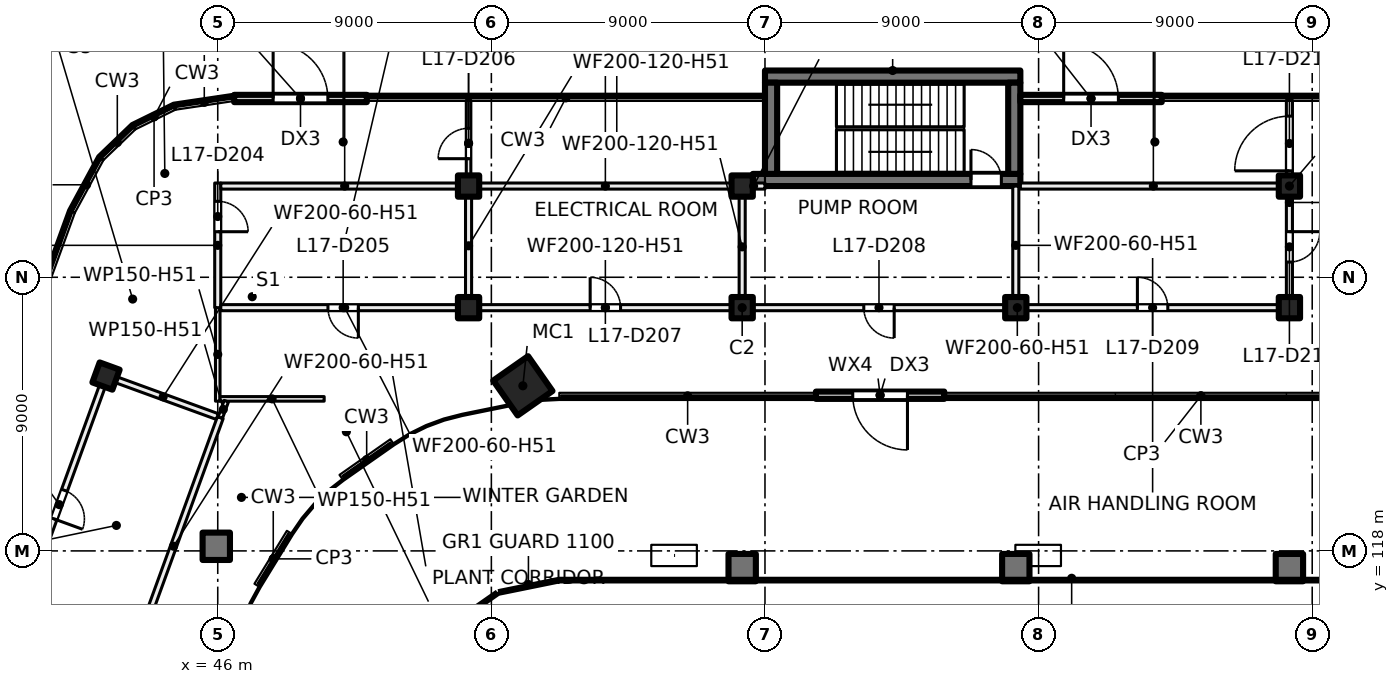
"""IFC4 building model, lengths in metres.
Left out: names, types, materials, properties, quantities, classifications, styles, units other than length and angle.
Written with IfcOpenShell. Run it as: python <this file> out.ifc"""

import sys

from ifc_helpers import new_model, si_unit, direction, frame, frame_2d, origin, origin_2d, place, context, subcontext, project, spatial, rectangle, hollow_rectangle, extrude, element, fill, save


model = new_model("IFC4")
c1 = context("Model", 3, precision=1e-05, world=origin(), true_north=direction((0.0, 1.0)))
c2 = subcontext(c1, "Body", "Model", "MODEL_VIEW")
j1 = project(units=[si_unit("LENGTHUNIT", "METRE"), si_unit("PLANEANGLEUNIT", "RADIAN")], contexts=[c1])
p1 = place(None, origin())
s1 = spatial("IfcSite", under=j1, at=p1, CompositionType="ELEMENT")
p2 = place(p1, origin())
s2 = spatial("IfcBuilding", under=s1, at=p2, CompositionType="ELEMENT")
p3 = place(p2, frame((0.0, 0.0, 75.5)))
s3 = spatial("IfcBuildingStorey", under=s2, at=p3, CompositionType="ELEMENT", Elevation=75.5)
p4 = place(p3, frame((56.036, 123.43, 0.0), z_axis=(0.0, 0.0, 1.0), x_axis=(0.573576436351, -0.819152044289, 0.0)))
e1 = element("IfcColumn", 1, at=p4, inside=s3, PredefinedType="COLUMN", context=c2, shape_type="SweptSolid", body=[
    extrude(hollow_rectangle(XDim=1.4, YDim=1.4, WallThickness=0.04, at=origin_2d()), origin(), (0.0, 0.0, 1.0), 5.5),
])
for number, where, z_axis, x_axis in (
    (2, (54.25, 130.0, 0.0), (0.0, 0.0, 1.0), (1.0, 0.0, 0.0)),
    (3, (63.25, 130.0, 0.0), (0.0, 0.0, 1.0), (1.0, 0.0, 0.0)),
    (4, (81.25, 130.0, 0.0), (0.0, 0.0, 1.0), (1.0, 0.0, 0.0)),
    (5, (54.25, 126.0, 0.0), (0.0, 0.0, 1.0), (1.0, 0.0, 0.0)),
    (6, (63.25, 126.0, 0.0), (0.0, 0.0, 1.0), (1.0, 0.0, 0.0)),
    (7, (72.25, 126.0, 0.0), (0.0, 0.0, 1.0), (1.0, 0.0, 0.0)),
    (8, (81.25, 126.0, 0.0), (0.0, 0.0, 1.0), (1.0, 0.0, 0.0)),
):
    element("IfcColumn", number, at=place(p3, frame(where, z_axis=z_axis, x_axis=x_axis)), inside=s3, PredefinedType="COLUMN", context=c2, shape_type="SweptSolid", body=[
        extrude(rectangle(XDim=0.7, YDim=0.7, at=origin_2d()), origin(), (0.0, 0.0, 1.0), 5.5),
    ])
for number, where, z_axis, x_axis in (
    (9, (45.952, 118.152, 0.0), (0.0, 0.0, 1.0), (1.0, 0.0, 0.0)),
    (10, (63.25, 117.45, 0.0), (0.0, 0.0, 1.0), (1.0, 0.0, 0.0)),
    (11, (72.25, 117.45, 0.0), (0.0, 0.0, 1.0), (1.0, 0.0, 0.0)),
    (12, (81.25, 117.45, 0.0), (0.0, 0.0, 1.0), (1.0, 0.0, 0.0)),
):
    element("IfcColumn", number, at=place(p3, frame(where, z_axis=z_axis, x_axis=x_axis)), inside=s3, PredefinedType="COLUMN", context=c2, shape_type="SweptSolid", body=[
        extrude(rectangle(XDim=0.9, YDim=0.9, at=origin_2d()), origin(), (0.0, 0.0, 1.0), 5.5),
    ])
p5 = place(p3, frame((42.325, 123.751, 0.0), z_axis=(0.0, 0.0, 1.0), x_axis=(-0.342020143326, -0.939692620786, 0.0)))
e13 = element("IfcColumn", 13, at=p5, inside=s3, PredefinedType="COLUMN", context=c2, shape_type="SweptSolid", body=[
    extrude(rectangle(XDim=0.7, YDim=0.7, at=origin_2d()), origin(), (0.0, 0.0, 1.0), 5.5),
])
p6 = place(p3, frame((63.6, 130.2, 0.0), z_axis=(0.0, 0.0, 1.0), x_axis=(1.0, 0.0, 0.0)))
e14 = element("IfcWall", 14, at=p6, inside=s3, PredefinedType="SHEAR", context=c2, shape_type="SweptSolid", body=[
    extrude(rectangle(XDim=8.8, YDim=0.4, at=frame_2d((4.4, 0.0))), origin(), (0.0, 0.0, 1.0), 5.5),
])
p7 = place(p6, frame((7.175, 0.0, 0.0)))
e15 = element("IfcOpeningElement", 15, at=p7, cuts=e14, PredefinedType="OPENING", context=c2, shape_type="SweptSolid", body=[
    extrude(rectangle(XDim=1.0, YDim=2.1, at=frame_2d((0.5, 1.05))), frame((0.0, 0.21, 0.0), z_axis=(0.0, -1.0, 0.0), x_axis=(1.0, 0.0, 0.0)), (0.0, 0.0, 1.0), 0.42),
])
p8 = place(p3, frame((64.0, 133.6, 0.0), z_axis=(0.0, 0.0, 1.0), x_axis=(1.0, 0.0, 0.0)))
e16 = element("IfcWall", 16, at=p8, inside=s3, PredefinedType="SHEAR", context=c2, shape_type="SweptSolid", body=[
    extrude(rectangle(XDim=8.4, YDim=0.4, at=frame_2d((4.2, 0.0))), origin(), (0.0, 0.0, 1.0), 5.5),
])
for number, where, z_axis, x_axis in (
    (17, (64.2, 130.4, 0.0), (0.0, 0.0, 1.0), (0.0, 1.0, 0.0)),
    (18, (72.2, 130.4, 0.0), (0.0, 0.0, 1.0), (0.0, 1.0, 0.0)),
):
    element("IfcWall", number, at=place(p3, frame(where, z_axis=z_axis, x_axis=x_axis)), inside=s3, PredefinedType="SHEAR", context=c2, shape_type="SweptSolid", body=[
        extrude(rectangle(XDim=3.0, YDim=0.4, at=frame_2d((1.5, 0.0))), origin(), (0.0, 0.0, 1.0), 5.5),
    ])
p9 = place(p3, frame((69.897, 123.12, 0.0), z_axis=(0.0, 0.0, 1.0), x_axis=(-1.0, 0.0, 0.0)))
e19 = element("IfcWall", 19, at=p9, inside=s3, PredefinedType="SOLIDWALL", context=c2, shape_type="SweptSolid", body=[
    extrude(rectangle(XDim=4.221, YDim=0.24, at=frame_2d((2.11, 0.0))), origin(), (0.0, 0.0, 1.0), 5.125),
])
p10 = place(p9, frame((1.21, 0.0, 0.0)))
e20 = element("IfcOpeningElement", 20, at=p10, cuts=e19, PredefinedType="OPENING", context=c2, shape_type="SweptSolid", body=[
    extrude(rectangle(XDim=1.8, YDim=2.4, at=frame_2d((0.9, 1.2))), frame((0.0, 0.13, 0.0), z_axis=(0.0, -1.0, 0.0), x_axis=(1.0, 0.0, 0.0)), (0.0, 0.0, 1.0), 0.26),
])
p11 = place(p3, frame((72.4, 132.88, 0.0), z_axis=(0.0, 0.0, 1.0), x_axis=(1.0, 0.0, 0.0)))
e21 = element("IfcWall", 21, at=p11, inside=s3, PredefinedType="SOLIDWALL", context=c2, shape_type="SweptSolid", body=[
    extrude(rectangle(XDim=4.65, YDim=0.24, at=frame_2d((2.325, 0.0))), origin(), (0.0, 0.0, 1.0), 5.125),
])
p12 = place(p11, frame((1.425, 0.0, 0.0)))
e22 = element("IfcOpeningElement", 22, at=p12, cuts=e21, PredefinedType="OPENING", context=c2, shape_type="SweptSolid", body=[
    extrude(rectangle(XDim=1.8, YDim=2.4, at=frame_2d((0.9, 1.2))), frame((0.0, 0.13, 0.0), z_axis=(0.0, -1.0, 0.0), x_axis=(1.0, 0.0, 0.0)), (0.0, 0.0, 1.0), 0.26),
])
p13 = place(p3, frame((46.539, 132.88, 0.0), z_axis=(0.0, 0.0, 1.0), x_axis=(1.0, 0.0, 0.0)))
e23 = element("IfcWall", 23, at=p13, inside=s3, PredefinedType="SOLIDWALL", context=c2, shape_type="SweptSolid", body=[
    extrude(rectangle(XDim=4.365, YDim=0.24, at=frame_2d((2.183, 0.0))), origin(), (0.0, 0.0, 1.0), 5.125),
])
p14 = place(p13, frame((1.283, 0.0, 0.0)))
e24 = element("IfcOpeningElement", 24, at=p14, cuts=e23, PredefinedType="OPENING", context=c2, shape_type="SweptSolid", body=[
    extrude(rectangle(XDim=1.8, YDim=2.4, at=frame_2d((0.9, 1.2))), frame((0.0, 0.13, 0.0), z_axis=(0.0, -1.0, 0.0), x_axis=(1.0, 0.0, 0.0)), (0.0, 0.0, 1.0), 0.26),
])
p15 = place(p3, frame((42.359, 123.845, 0.0), z_axis=(0.0, 0.0, 1.0), x_axis=(-0.341966001916, -0.939712324881, 0.0)))
e25 = element("IfcWall", 25, at=p15, inside=s3, PredefinedType="PARTITIONING", context=c2, shape_type="SweptSolid", body=[
    extrude(rectangle(XDim=18.2, YDim=0.2, at=frame_2d((9.1, 0.0))), origin(), (0.0, 0.0, 1.0), 5.125),
])
p16 = place(p15, frame((13.101, 0.0, 0.0)))
e26 = element("IfcOpeningElement", 26, at=p16, cuts=e25, PredefinedType="OPENING", context=c2, shape_type="SweptSolid", body=[
    extrude(rectangle(XDim=1.0, YDim=2.1, at=frame_2d((0.5, 1.05))), frame((0.0, 0.11, 0.0), z_axis=(0.0, -1.0, 0.0), x_axis=(1.0, 0.0, 0.0)), (0.0, 0.0, 1.0), 0.22),
])
p17 = place(p15, frame((4.1, 0.0, 0.0)))
e27 = element("IfcOpeningElement", 27, at=p17, cuts=e25, PredefinedType="OPENING", context=c2, shape_type="SweptSolid", body=[
    extrude(rectangle(XDim=1.0, YDim=2.1, at=frame_2d((0.5, 1.05))), frame((0.0, 0.11, 0.0), z_axis=(0.0, -1.0, 0.0), x_axis=(1.0, 0.0, 0.0)), (0.0, 0.0, 1.0), 0.22),
])
p18 = place(p3, frame((42.419, 123.717, 0.0), z_axis=(0.0, 0.0, 1.0), x_axis=(0.939667689469, -0.342088633789, 0.0)))
e28 = element("IfcWall", 28, at=p18, inside=s3, PredefinedType="PARTITIONING", context=c2, shape_type="SweptSolid", body=[
    extrude(rectangle(XDim=3.8, YDim=0.2, at=frame_2d((1.9, 0.0))), origin(), (0.0, 0.0, 1.0), 5.125),
])
p19 = place(p3, frame((43.006, 113.925, 0.0), z_axis=(0.0, 0.0, 1.0), x_axis=(0.341963022424, 0.939713409128, 0.0)))
e29 = element("IfcWall", 29, at=p19, inside=s3, PredefinedType="PARTITIONING", context=c2, shape_type="SweptSolid", body=[
    extrude(rectangle(XDim=9.001, YDim=0.2, at=frame_2d((4.5, 0.0))), origin(), (0.0, 0.0, 1.0), 5.125),
])
p20 = place(p3, frame((46.0, 122.925, 0.0), z_axis=(0.0, 0.0, 1.0), x_axis=(0.0, 1.0, 0.0)))
e30 = element("IfcWall", 30, at=p20, inside=s3, PredefinedType="PARTITIONING", context=c2, shape_type="SweptSolid", body=[
    extrude(rectangle(XDim=3.075, YDim=0.15, at=frame_2d((1.538, 0.0))), origin(), (0.0, 0.0, 1.0), 5.125),
])
p21 = place(p3, frame((46.075, 123.0, 0.0), z_axis=(0.0, 0.0, 1.0), x_axis=(1.0, 0.0, 0.0)))
e31 = element("IfcWall", 31, at=p21, inside=s3, PredefinedType="PARTITIONING", context=c2, shape_type="SweptSolid", body=[
    extrude(rectangle(XDim=3.426, YDim=0.15, at=frame_2d((1.713, 0.0))), origin(), (0.0, 0.0, 1.0), 5.125),
])
p22 = place(p3, frame((46.0, 130.1, 0.0), z_axis=(0.0, 0.0, 1.0), x_axis=(0.0, -1.0, 0.0)))
e32 = element("IfcWall", 32, at=p22, inside=s3, PredefinedType="PARTITIONING", context=c2, shape_type="SweptSolid", body=[
    extrude(rectangle(XDim=4.1, YDim=0.2, at=frame_2d((2.05, 0.0))), origin(), (0.0, 0.0, 1.0), 5.125),
])
p23 = place(p22, frame((0.602, 0.0, 0.0)))
e33 = element("IfcOpeningElement", 33, at=p23, cuts=e32, PredefinedType="OPENING", context=c2, shape_type="SweptSolid", body=[
    extrude(rectangle(XDim=1.0, YDim=2.1, at=frame_2d((0.5, 1.05))), frame((0.0, 0.11, 0.0), z_axis=(0.0, -1.0, 0.0), x_axis=(1.0, 0.0, 0.0)), (0.0, 0.0, 1.0), 0.22),
])
p24 = place(p3, frame((46.1, 126.0, 0.0), z_axis=(0.0, 0.0, 1.0), x_axis=(1.0, 0.0, 0.0)))
e34 = element("IfcWall", 34, at=p24, inside=s3, PredefinedType="PARTITIONING", context=c2, shape_type="SweptSolid", body=[
    extrude(rectangle(XDim=8.15, YDim=0.2, at=frame_2d((4.075, 0.0))), origin(), (0.0, 0.0, 1.0), 5.125),
])
p25 = place(p24, frame((3.525, 0.0, 0.0)))
e35 = element("IfcOpeningElement", 35, at=p25, cuts=e34, PredefinedType="OPENING", context=c2, shape_type="SweptSolid", body=[
    extrude(rectangle(XDim=1.0, YDim=2.1, at=frame_2d((0.5, 1.05))), frame((0.0, 0.11, 0.0), z_axis=(0.0, -1.0, 0.0), x_axis=(1.0, 0.0, 0.0)), (0.0, 0.0, 1.0), 0.22),
])
p26 = place(p3, frame((46.1, 130.0, 0.0), z_axis=(0.0, 0.0, 1.0), x_axis=(1.0, 0.0, 0.0)))
e36 = element("IfcWall", 36, at=p26, inside=s3, PredefinedType="PARTITIONING", context=c2, shape_type="SweptSolid", body=[
    extrude(rectangle(XDim=8.15, YDim=0.2, at=frame_2d((4.075, 0.0))), origin(), (0.0, 0.0, 1.0), 5.125),
])
p27 = place(p3, frame((46.084, 122.383, 0.0), z_axis=(0.0, 0.0, 1.0), x_axis=(0.343135526399, 0.939285904569, 0.0)))
e37 = element("IfcWall", 37, at=p27, inside=s3, PredefinedType="PARTITIONING", context=c2, shape_type="SweptSolid", body=[
    extrude(rectangle(XDim=0.577, YDim=0.15, at=frame_2d((0.289, 0.0))), origin(), (0.0, 0.0, 1.0), 5.125),
])
p28 = place(p3, frame((54.25, 126.1, 0.0), z_axis=(0.0, 0.0, 1.0), x_axis=(0.0, 1.0, 0.0)))
e38 = element("IfcWall", 38, at=p28, inside=s3, PredefinedType="PARTITIONING", context=c2, shape_type="SweptSolid", body=[
    extrude(rectangle(XDim=3.87, YDim=0.2, at=frame_2d((1.935, 0.0))), origin(), (0.0, 0.0, 1.0), 5.125),
])
p29 = place(p3, frame((54.25, 126.0, 0.0), z_axis=(0.0, 0.0, 1.0), x_axis=(1.0, 0.0, 0.0)))
e39 = element("IfcWall", 39, at=p29, inside=s3, PredefinedType="PARTITIONING", context=c2, shape_type="SweptSolid", body=[
    extrude(rectangle(XDim=9.0, YDim=0.2, at=frame_2d((4.5, 0.0))), origin(), (0.0, 0.0, 1.0), 5.125),
])
p30 = place(p29, frame((4.0, 0.0, 0.0)))
e40 = element("IfcOpeningElement", 40, at=p30, cuts=e39, PredefinedType="OPENING", context=c2, shape_type="SweptSolid", body=[
    extrude(rectangle(XDim=1.0, YDim=2.1, at=frame_2d((0.5, 1.05))), frame((0.0, 0.11, 0.0), z_axis=(0.0, -1.0, 0.0), x_axis=(1.0, 0.0, 0.0)), (0.0, 0.0, 1.0), 0.22),
])
p31 = place(p3, frame((54.25, 130.0, 0.0), z_axis=(0.0, 0.0, 1.0), x_axis=(0.0, 1.0, 0.0)))
e41 = element("IfcWall", 41, at=p31, inside=s3, PredefinedType="PARTITIONING", context=c2, shape_type="SweptSolid", body=[
    extrude(rectangle(XDim=2.82, YDim=0.15, at=frame_2d((1.41, 0.0))), origin(), (0.0, 0.0, 1.0), 5.125),
])
p32 = place(p31, frame((0.9, 0.0, 0.0)))
e42 = element("IfcOpeningElement", 42, at=p32, cuts=e41, PredefinedType="OPENING", context=c2, shape_type="SweptSolid", body=[
    extrude(rectangle(XDim=1.0, YDim=2.1, at=frame_2d((0.5, 1.05))), frame((0.0, 0.085, 0.0), z_axis=(0.0, -1.0, 0.0), x_axis=(1.0, 0.0, 0.0)), (0.0, 0.0, 1.0), 0.17),
])
p33 = place(p3, frame((54.25, 130.0, 0.0), z_axis=(0.0, 0.0, 1.0), x_axis=(1.0, 0.0, 0.0)))
e43 = element("IfcWall", 43, at=p33, inside=s3, PredefinedType="PARTITIONING", context=c2, shape_type="SweptSolid", body=[
    extrude(rectangle(XDim=9.0, YDim=0.2, at=frame_2d((4.5, 0.0))), origin(), (0.0, 0.0, 1.0), 5.125),
])
p34 = place(p3, frame((63.25, 126.1, 0.0), z_axis=(0.0, 0.0, 1.0), x_axis=(0.0, 1.0, 0.0)))
e44 = element("IfcWall", 44, at=p34, inside=s3, PredefinedType="PARTITIONING", context=c2, shape_type="SweptSolid", body=[
    extrude(rectangle(XDim=3.8, YDim=0.2, at=frame_2d((1.9, 0.0))), origin(), (0.0, 0.0, 1.0), 5.125),
])
p35 = place(p3, frame((63.25, 126.0, 0.0), z_axis=(0.0, 0.0, 1.0), x_axis=(1.0, 0.0, 0.0)))
e45 = element("IfcWall", 45, at=p35, inside=s3, PredefinedType="PARTITIONING", context=c2, shape_type="SweptSolid", body=[
    extrude(rectangle(XDim=18.1, YDim=0.2, at=frame_2d((9.05, 0.0))), origin(), (0.0, 0.0, 1.0), 5.125),
])
p36 = place(p35, frame((4.0, 0.0, 0.0)))
e46 = element("IfcOpeningElement", 46, at=p36, cuts=e45, PredefinedType="OPENING", context=c2, shape_type="SweptSolid", body=[
    extrude(rectangle(XDim=1.0, YDim=2.1, at=frame_2d((0.5, 1.05))), frame((0.0, 0.11, 0.0), z_axis=(0.0, -1.0, 0.0), x_axis=(1.0, 0.0, 0.0)), (0.0, 0.0, 1.0), 0.22),
])
p37 = place(p35, frame((13.0, 0.0, 0.0)))
e47 = element("IfcOpeningElement", 47, at=p37, cuts=e45, PredefinedType="OPENING", context=c2, shape_type="SweptSolid", body=[
    extrude(rectangle(XDim=1.0, YDim=2.1, at=frame_2d((0.5, 1.05))), frame((0.0, 0.11, 0.0), z_axis=(0.0, -1.0, 0.0), x_axis=(1.0, 0.0, 0.0)), (0.0, 0.0, 1.0), 0.22),
])
p38 = place(p3, frame((63.25, 130.0, 0.0), z_axis=(0.0, 0.0, 1.0), x_axis=(1.0, 0.0, 0.0)))
e48 = element("IfcWall", 48, at=p38, inside=s3, PredefinedType="PARTITIONING", context=c2, shape_type="SweptSolid", body=[
    extrude(rectangle(XDim=0.75, YDim=0.2, at=frame_2d((0.375, 0.0))), origin(), (0.0, 0.0, 1.0), 5.125),
])
p39 = place(p3, frame((72.25, 126.1, 0.0), z_axis=(0.0, 0.0, 1.0), x_axis=(0.0, 1.0, 0.0)))
e49 = element("IfcWall", 49, at=p39, inside=s3, PredefinedType="PARTITIONING", context=c2, shape_type="SweptSolid", body=[
    extrude(rectangle(XDim=3.9, YDim=0.2, at=frame_2d((1.95, 0.0))), origin(), (0.0, 0.0, 1.0), 5.125),
])
p40 = place(p3, frame((72.4, 130.0, 0.0), z_axis=(0.0, 0.0, 1.0), x_axis=(1.0, 0.0, 0.0)))
e50 = element("IfcWall", 50, at=p40, inside=s3, PredefinedType="PARTITIONING", context=c2, shape_type="SweptSolid", body=[
    extrude(rectangle(XDim=8.75, YDim=0.2, at=frame_2d((4.375, 0.0))), origin(), (0.0, 0.0, 1.0), 5.125),
])
p41 = place(p3, frame((81.25, 126.1, 0.0), z_axis=(0.0, 0.0, 1.0), x_axis=(0.0, 1.0, 0.0)))
e51 = element("IfcWall", 51, at=p41, inside=s3, PredefinedType="PARTITIONING", context=c2, shape_type="SweptSolid", body=[
    extrude(rectangle(XDim=6.72, YDim=0.2, at=frame_2d((3.36, 0.0))), origin(), (0.0, 0.0, 1.0), 5.125),
])
p42 = place(p41, frame((1.4, 0.0, 0.0)))
e52 = element("IfcOpeningElement", 52, at=p42, cuts=e51, PredefinedType="OPENING", context=c2, shape_type="SweptSolid", body=[
    extrude(rectangle(XDim=1.0, YDim=2.1, at=frame_2d((0.5, 1.05))), frame((0.0, 0.11, 0.0), z_axis=(0.0, -1.0, 0.0), x_axis=(1.0, 0.0, 0.0)), (0.0, 0.0, 1.0), 0.22),
])
p43 = place(p41, frame((4.4, 0.0, 0.0)))
e53 = element("IfcOpeningElement", 53, at=p43, cuts=e51, PredefinedType="OPENING", context=c2, shape_type="SweptSolid", body=[
    extrude(rectangle(XDim=1.8, YDim=2.1, at=frame_2d((0.9, 1.05))), frame((0.0, 0.11, 0.0), z_axis=(0.0, -1.0, 0.0), x_axis=(1.0, 0.0, 0.0)), (0.0, 0.0, 1.0), 0.22),
])
p44 = place(p10, origin())
e54 = element("IfcDoor", 54, at=p44, inside=s3, OperationType="DOUBLE_DOOR_SINGLE_SWING", PredefinedType="DOOR", context=c2, shape_type="SweptSolid", body=[
    extrude(rectangle(XDim=1.8, YDim=2.4, at=frame_2d((0.9, 1.2))), frame((0.0, 0.025, 0.0), z_axis=(0.0, -1.0, 0.0), x_axis=(1.0, 0.0, 0.0)), (0.0, 0.0, 1.0), 0.05),
])
fill(e20, e54)
p45 = place(p12, origin())
e55 = element("IfcDoor", 55, at=p45, inside=s3, OperationType="DOUBLE_DOOR_SINGLE_SWING", PredefinedType="DOOR", context=c2, shape_type="SweptSolid", body=[
    extrude(rectangle(XDim=1.8, YDim=2.4, at=frame_2d((0.9, 1.2))), frame((0.0, 0.025, 0.0), z_axis=(0.0, -1.0, 0.0), x_axis=(1.0, 0.0, 0.0)), (0.0, 0.0, 1.0), 0.05),
])
fill(e22, e55)
p46 = place(p14, origin())
e56 = element("IfcDoor", 56, at=p46, inside=s3, OperationType="DOUBLE_DOOR_SINGLE_SWING", PredefinedType="DOOR", context=c2, shape_type="SweptSolid", body=[
    extrude(rectangle(XDim=1.8, YDim=2.4, at=frame_2d((0.9, 1.2))), frame((0.0, 0.025, 0.0), z_axis=(0.0, -1.0, 0.0), x_axis=(1.0, 0.0, 0.0)), (0.0, 0.0, 1.0), 0.05),
])
fill(e24, e56)
p47 = place(p7, origin())
e57 = element("IfcDoor", 57, at=p47, inside=s3, OperationType="SINGLE_SWING_LEFT", PredefinedType="DOOR", context=c2, shape_type="SweptSolid", body=[
    extrude(rectangle(XDim=1.0, YDim=2.1, at=frame_2d((0.5, 1.05))), frame((0.0, 0.025, 0.0), z_axis=(0.0, -1.0, 0.0), x_axis=(1.0, 0.0, 0.0)), (0.0, 0.0, 1.0), 0.05),
])
fill(e15, e57)
p48 = place(p17, origin())
e58 = element("IfcDoor", 58, at=p48, inside=s3, OperationType="SINGLE_SWING_RIGHT", PredefinedType="DOOR", context=c2, shape_type="SweptSolid", body=[
    extrude(rectangle(XDim=1.0, YDim=2.1, at=frame_2d((0.5, 1.05))), frame((0.0, 0.025, 0.0), z_axis=(0.0, -1.0, 0.0), x_axis=(1.0, 0.0, 0.0)), (0.0, 0.0, 1.0), 0.05),
])
fill(e27, e58)
p49 = place(p23, origin())
e59 = element("IfcDoor", 59, at=p49, inside=s3, OperationType="SINGLE_SWING_RIGHT", PredefinedType="DOOR", context=c2, shape_type="SweptSolid", body=[
    extrude(rectangle(XDim=1.0, YDim=2.1, at=frame_2d((0.5, 1.05))), frame((0.0, 0.025, 0.0), z_axis=(0.0, -1.0, 0.0), x_axis=(1.0, 0.0, 0.0)), (0.0, 0.0, 1.0), 0.05),
])
fill(e33, e59)
p50 = place(p25, origin())
e60 = element("IfcDoor", 60, at=p50, inside=s3, OperationType="SINGLE_SWING_RIGHT", PredefinedType="DOOR", context=c2, shape_type="SweptSolid", body=[
    extrude(rectangle(XDim=1.0, YDim=2.1, at=frame_2d((0.5, 1.05))), frame((0.0, 0.025, 0.0), z_axis=(0.0, -1.0, 0.0), x_axis=(1.0, 0.0, 0.0)), (0.0, 0.0, 1.0), 0.05),
])
fill(e35, e60)
p51 = place(p32, origin())
e61 = element("IfcDoor", 61, at=p51, inside=s3, OperationType="SINGLE_SWING_LEFT", PredefinedType="DOOR", context=c2, shape_type="SweptSolid", body=[
    extrude(rectangle(XDim=1.0, YDim=2.1, at=frame_2d((0.5, 1.05))), frame((0.0, 0.025, 0.0), z_axis=(0.0, -1.0, 0.0), x_axis=(1.0, 0.0, 0.0)), (0.0, 0.0, 1.0), 0.05),
])
fill(e42, e61)
p52 = place(p30, origin())
e62 = element("IfcDoor", 62, at=p52, inside=s3, OperationType="SINGLE_SWING_LEFT", PredefinedType="DOOR", context=c2, shape_type="SweptSolid", body=[
    extrude(rectangle(XDim=1.0, YDim=2.1, at=frame_2d((0.5, 1.05))), frame((0.0, 0.025, 0.0), z_axis=(0.0, -1.0, 0.0), x_axis=(1.0, 0.0, 0.0)), (0.0, 0.0, 1.0), 0.05),
])
fill(e40, e62)
p53 = place(p36, origin())
e63 = element("IfcDoor", 63, at=p53, inside=s3, OperationType="SINGLE_SWING_RIGHT", PredefinedType="DOOR", context=c2, shape_type="SweptSolid", body=[
    extrude(rectangle(XDim=1.0, YDim=2.1, at=frame_2d((0.5, 1.05))), frame((0.0, 0.025, 0.0), z_axis=(0.0, -1.0, 0.0), x_axis=(1.0, 0.0, 0.0)), (0.0, 0.0, 1.0), 0.05),
])
fill(e46, e63)
p54 = place(p37, origin())
e64 = element("IfcDoor", 64, at=p54, inside=s3, OperationType="SINGLE_SWING_LEFT", PredefinedType="DOOR", context=c2, shape_type="SweptSolid", body=[
    extrude(rectangle(XDim=1.0, YDim=2.1, at=frame_2d((0.5, 1.05))), frame((0.0, 0.025, 0.0), z_axis=(0.0, -1.0, 0.0), x_axis=(1.0, 0.0, 0.0)), (0.0, 0.0, 1.0), 0.05),
])
fill(e47, e64)
p55 = place(p42, origin())
e65 = element("IfcDoor", 65, at=p55, inside=s3, OperationType="SINGLE_SWING_RIGHT", PredefinedType="DOOR", context=c2, shape_type="SweptSolid", body=[
    extrude(rectangle(XDim=1.0, YDim=2.1, at=frame_2d((0.5, 1.05))), frame((0.0, 0.025, 0.0), z_axis=(0.0, -1.0, 0.0), x_axis=(1.0, 0.0, 0.0)), (0.0, 0.0, 1.0), 0.05),
])
fill(e52, e65)
p56 = place(p43, origin())
e66 = element("IfcDoor", 66, at=p56, inside=s3, OperationType="DOUBLE_DOOR_SINGLE_SWING", PredefinedType="DOOR", context=c2, shape_type="SweptSolid", body=[
    extrude(rectangle(XDim=1.8, YDim=2.1, at=frame_2d((0.9, 1.05))), frame((0.0, 0.025, 0.0), z_axis=(0.0, -1.0, 0.0), x_axis=(1.0, 0.0, 0.0)), (0.0, 0.0, 1.0), 0.05),
])
fill(e53, e66)
save(model, sys.argv[1])
